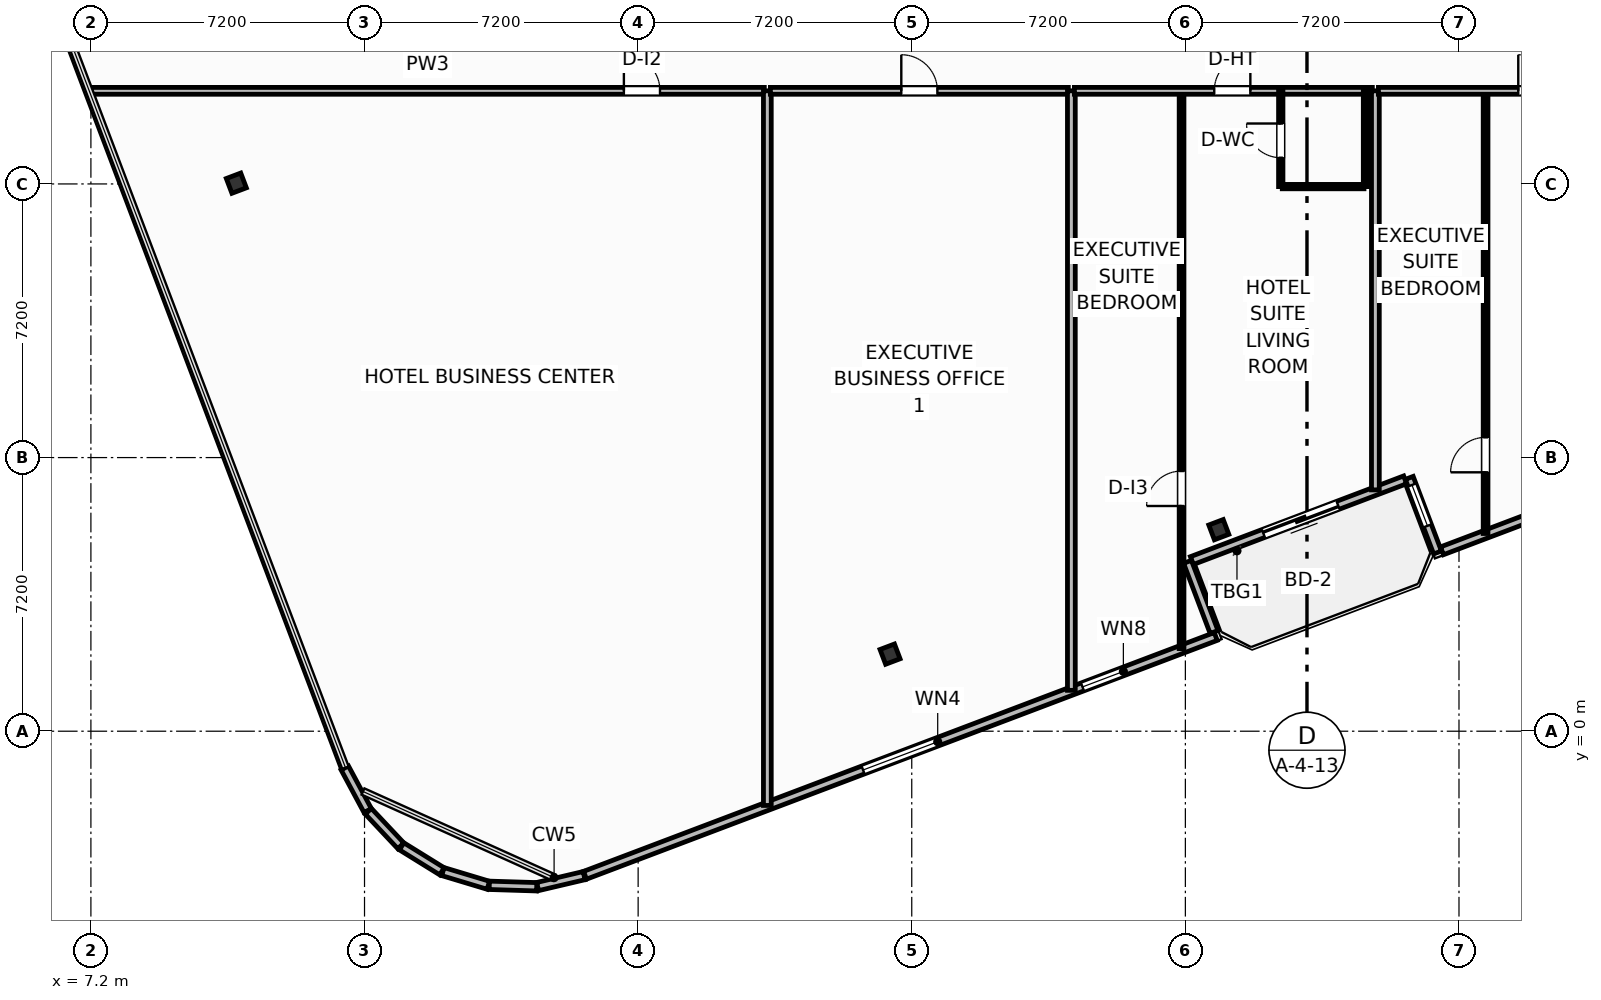
"""IFC4 building model, lengths in metres.
Left out: names, types, materials, properties, quantities, classifications, styles, units other than length and angle.
Written with IfcOpenShell. Run it as: python <this file> out.ifc"""

import sys

from ifc_helpers import new_model, si_unit, direction, frame, frame_2d, origin, origin_2d, place, context, subcontext, project, spatial, rectangle, i_section, extrude, element, fill, save


model = new_model("IFC4")
c1 = context("Model", 3, precision=1e-05, world=origin(), true_north=direction((0.0, 1.0)))
c2 = subcontext(c1, "Body", "Model", "MODEL_VIEW")
j1 = project(units=[si_unit("LENGTHUNIT", "METRE"), si_unit("PLANEANGLEUNIT", "RADIAN")], contexts=[c1])
p1 = place(None, origin())
s1 = spatial("IfcSite", under=j1, at=p1, CompositionType="ELEMENT")
p2 = place(p1, origin())
s2 = spatial("IfcBuilding", under=s1, at=p2, CompositionType="ELEMENT")
p3 = place(p2, frame((0.0, 0.0, 242.3)))
s3 = spatial("IfcBuildingStorey", under=s2, at=p3, CompositionType="ELEMENT", Elevation=242.3)
for number, where, z_axis, x_axis in (
    (1, (28.229, 2.028, 0.0), (0.0, 0.0, 1.0), (0.935, 0.354, 0.0)),
    (2, (36.88, 5.303, 0.0), (0.0, 0.0, 1.0), (0.935, 0.354, 0.0)),
    (3, (11.027, 14.42, 0.0), (0.0, 0.0, 1.0), (0.935, 0.354, 0.0)),
):
    element("IfcColumn", number, at=place(p3, frame(where, z_axis=z_axis, x_axis=x_axis)), inside=s3, PredefinedType="COLUMN", context=c2, shape_type="SweptSolid", body=[
        extrude(i_section(OverallWidth=0.406, OverallDepth=0.416, WebThickness=0.03, FlangeThickness=0.048, FilletRadius=0.025, at=origin_2d()), origin(), (0.0, 0.0, 1.0), 3.7),
    ])
p4 = place(p3, frame((41.783, 6.614, 0.0), z_axis=(0.0, 0.0, 1.0), x_axis=(-0.93521416643, -0.354082565101, 0.0)))
e4 = element("IfcWall", 4, at=p4, inside=s3, PredefinedType="SOLIDWALL", context=c2, shape_type="SweptSolid", body=[
    extrude(rectangle(XDim=6.0, YDim=0.22, at=frame_2d((3.0, 0.0))), origin(), (0.0, 0.0, 1.0), 2.73),
])
p5 = place(p4, frame((1.888, 0.0, 0.0)))
e5 = element("IfcOpeningElement", 5, at=p5, cuts=e4, PredefinedType="OPENING", context=c2, shape_type="SweptSolid", body=[
    extrude(rectangle(XDim=2.1, YDim=2.3, at=frame_2d((1.05, 1.15))), frame((0.0, 0.12, 0.0), z_axis=(0.0, -1.0, 0.0), x_axis=(1.0, 0.0, 0.0)), (0.0, 0.0, 1.0), 0.24),
])
p6 = place(p3, frame((13.881, -0.966, 0.0), z_axis=(0.0, 0.0, 1.0), x_axis=(0.473242342135, -0.88093228208, 0.0)))
e6 = element("IfcWall", 6, at=p6, inside=s3, PredefinedType="SOLIDWALL", context=c2, shape_type="SweptSolid", body=[
    extrude(rectangle(XDim=1.274, YDim=0.22, at=frame_2d((0.637, 0.0))), origin(), (0.0, 0.0, 1.0), 2.73),
])
for number, where, z_axis, x_axis in (
    (7, (14.5, -2.106, 0.0), (0.0, 0.0, 1.0), (0.685, -0.729, 0.0)),
    (8, (15.377, -3.029, 0.0), (0.0, 0.0, 1.0), (0.85, -0.526, 0.0)),
    (9, (16.463, -3.694, 0.0), (0.0, 0.0, 1.0), (0.958, -0.288, 0.0)),
):
    element("IfcWall", number, at=place(p3, frame(where, z_axis=z_axis, x_axis=x_axis)), inside=s3, PredefinedType="SOLIDWALL", context=c2, shape_type="SweptSolid", body=[
        extrude(rectangle(XDim=1.249, YDim=0.22, at=frame_2d((0.624, 0.0))), origin(), (0.0, 0.0, 1.0), 2.73),
    ])
p7 = place(p3, frame((17.683, -4.055, 0.0), z_axis=(0.0, 0.0, 1.0), x_axis=(0.999522886512, -0.030886879732, 0.0)))
e10 = element("IfcWall", 10, at=p7, inside=s3, PredefinedType="SOLIDWALL", context=c2, shape_type="SweptSolid", body=[
    extrude(rectangle(XDim=1.249, YDim=0.22, at=frame_2d((0.625, 0.0))), origin(), (0.0, 0.0, 1.0), 2.73),
])
p8 = place(p3, frame((18.956, -4.087, 0.0), z_axis=(0.0, 0.0, 1.0), x_axis=(0.973463008152, 0.228844426981, 0.0)))
e11 = element("IfcWall", 11, at=p8, inside=s3, PredefinedType="SOLIDWALL", context=c2, shape_type="SweptSolid", body=[
    extrude(rectangle(XDim=1.257, YDim=0.22, at=frame_2d((0.628, 0.0))), origin(), (0.0, 0.0, 1.0), 2.73),
])
p9 = place(p3, frame((20.202, -3.791, 0.0), z_axis=(0.0, 0.0, 1.0), x_axis=(0.935225574232, 0.354052432984, 0.0)))
e12 = element("IfcWall", 12, at=p9, inside=s3, PredefinedType="SOLIDWALL", context=c2, shape_type="SweptSolid", body=[
    extrude(rectangle(XDim=17.747, YDim=0.22, at=frame_2d((8.874, 0.0))), origin(), (0.0, 0.0, 1.0), 2.73),
])
p10 = place(p9, frame((7.823, 0.0, 0.8)))
e13 = element("IfcOpeningElement", 13, at=p10, cuts=e12, PredefinedType="OPENING", context=c2, shape_type="SweptSolid", body=[
    extrude(rectangle(XDim=2.1, YDim=1.75, at=frame_2d((1.05, 0.875))), frame((0.0, 0.12, 0.0), z_axis=(0.0, -1.0, 0.0), x_axis=(1.0, 0.0, 0.0)), (0.0, 0.0, 1.0), 0.24),
])
p11 = place(p9, frame((13.998, 0.0, 0.8)))
e14 = element("IfcOpeningElement", 14, at=p11, cuts=e12, PredefinedType="OPENING", context=c2, shape_type="SweptSolid", body=[
    extrude(rectangle(XDim=1.15, YDim=1.4, at=frame_2d((0.575, 0.7))), frame((0.0, 0.12, 0.0), z_axis=(0.0, -1.0, 0.0), x_axis=(1.0, 0.0, 0.0)), (0.0, 0.0, 1.0), 0.24),
])
p12 = place(p3, frame((36.755, 2.61, 0.0), z_axis=(0.0, 0.0, 1.0), x_axis=(-0.354020680661, 0.935237594232, 0.0)))
e15 = element("IfcWall", 15, at=p12, inside=s3, PredefinedType="SOLIDWALL", context=c2, shape_type="SweptSolid", body=[
    extrude(rectangle(XDim=1.975, YDim=0.22, at=frame_2d((0.988, 0.0))), origin(), (0.0, 0.0, 1.0), 2.73),
])
p13 = place(p3, frame((41.892, 6.666, 0.0), z_axis=(0.0, 0.0, 1.0), x_axis=(0.354128469405, -0.935196785258, 0.0)))
e16 = element("IfcWall", 16, at=p13, inside=s3, PredefinedType="SOLIDWALL", context=c2, shape_type="SweptSolid", body=[
    extrude(rectangle(XDim=2.1, YDim=0.22, at=frame_2d((1.05, 0.0))), origin(), (0.0, 0.0, 1.0), 2.73),
])
p14 = place(p13, frame((0.2, 0.0, 0.8)))
e17 = element("IfcOpeningElement", 17, at=p14, cuts=e16, PredefinedType="OPENING", context=c2, shape_type="SweptSolid", body=[
    extrude(rectangle(XDim=1.15, YDim=1.4, at=frame_2d((0.575, 0.7))), frame((0.0, 0.12, 0.0), z_axis=(0.0, -1.0, 0.0), x_axis=(1.0, 0.0, 0.0)), (0.0, 0.0, 1.0), 0.24),
])
p15 = place(p3, frame((42.752, 4.746, 0.0), z_axis=(0.0, 0.0, 1.0), x_axis=(0.935216926991, 0.354075273733, 0.0)))
e18 = element("IfcWall", 18, at=p15, inside=s3, PredefinedType="SOLIDWALL", context=c2, shape_type="SweptSolid", body=[
    extrude(rectangle(XDim=8.035, YDim=0.22, at=frame_2d((4.018, 0.0))), origin(), (0.0, 0.0, 1.0), 2.73),
])
p16 = place(p15, frame((2.968, 0.0, 0.8)))
e19 = element("IfcOpeningElement", 19, at=p16, cuts=e18, PredefinedType="OPENING", context=c2, shape_type="SweptSolid", body=[
    extrude(rectangle(XDim=2.1, YDim=1.75, at=frame_2d((1.05, 0.875))), frame((0.0, 0.12, 0.0), z_axis=(0.0, -1.0, 0.0), x_axis=(1.0, 0.0, 0.0)), (0.0, 0.0, 1.0), 0.24),
])
p17 = place(p3, frame((7.196, 16.85, 0.0), z_axis=(0.0, 0.0, 1.0), x_axis=(1.0, 0.0, 0.0)))
e20 = element("IfcWall", 20, at=p17, inside=s3, PredefinedType="PARTITIONING", context=c2, shape_type="SweptSolid", body=[
    extrude(rectangle(XDim=17.724, YDim=0.18, at=frame_2d((8.862, 0.0))), origin(), (0.0, 0.0, 1.0), 3.45),
])
p18 = place(p17, frame((14.029, 0.0, 0.0)))
e21 = element("IfcOpeningElement", 21, at=p18, cuts=e20, PredefinedType="OPENING", context=c2, shape_type="SweptSolid", body=[
    extrude(rectangle(XDim=0.95, YDim=2.05, at=frame_2d((0.475, 1.025))), frame((0.0, 0.1, 0.0), z_axis=(0.0, -1.0, 0.0), x_axis=(1.0, 0.0, 0.0)), (0.0, 0.0, 1.0), 0.2),
])
p19 = place(p3, frame((25.0, -1.953, 0.0), z_axis=(0.0, 0.0, 1.0), x_axis=(0.0, 1.0, 0.0)))
e22 = element("IfcWall", 22, at=p19, inside=s3, PredefinedType="PARTITIONING", context=c2, shape_type="SweptSolid", body=[
    extrude(rectangle(XDim=18.803, YDim=0.205, at=frame_2d((9.402, 0.0))), origin(), (0.0, 0.0, 1.0), 2.739),
])
p20 = place(p3, frame((25.08, 16.85, 0.0), z_axis=(0.0, 0.0, 1.0), x_axis=(1.0, 0.0, 0.0)))
e23 = element("IfcWall", 23, at=p20, inside=s3, PredefinedType="PARTITIONING", context=c2, shape_type="SweptSolid", body=[
    extrude(rectangle(XDim=7.84, YDim=0.18, at=frame_2d((3.92, 0.0))), origin(), (0.0, 0.0, 1.0), 3.45),
])
p21 = place(p20, frame((3.445, 0.0, 0.0)))
e24 = element("IfcOpeningElement", 24, at=p21, cuts=e23, PredefinedType="OPENING", context=c2, shape_type="SweptSolid", body=[
    extrude(rectangle(XDim=0.95, YDim=2.05, at=frame_2d((0.475, 1.025))), frame((0.0, 0.1, 0.0), z_axis=(0.0, -1.0, 0.0), x_axis=(1.0, 0.0, 0.0)), (0.0, 0.0, 1.0), 0.2),
])
p22 = place(p3, frame((33.0, 1.076, 0.0), z_axis=(0.0, 0.0, 1.0), x_axis=(0.0, 1.0, 0.0)))
e25 = element("IfcWall", 25, at=p22, inside=s3, PredefinedType="PARTITIONING", context=c2, shape_type="SweptSolid", body=[
    extrude(rectangle(XDim=15.774, YDim=0.205, at=frame_2d((7.887, 0.0))), origin(), (0.0, 0.0, 1.0), 3.45),
])
p23 = place(p3, frame((35.9, 2.174, 0.0), z_axis=(0.0, 0.0, 1.0), x_axis=(0.0, 1.0, 0.0)))
e26 = element("IfcWall", 26, at=p23, inside=s3, PredefinedType="PARTITIONING", context=c2, shape_type="SweptSolid", body=[
    extrude(rectangle(XDim=14.677, YDim=0.125, at=frame_2d((7.338, 0.0))), origin(), (0.0, 0.0, 1.0), 2.739),
])
p24 = place(p23, frame((3.752, 0.0, 0.0)))
e27 = element("IfcOpeningElement", 27, at=p24, cuts=e26, PredefinedType="OPENING", context=c2, shape_type="SweptSolid", body=[
    extrude(rectangle(XDim=0.92, YDim=2.05, at=frame_2d((0.46, 1.025))), frame((0.0, 0.073, 0.0), z_axis=(0.0, -1.0, 0.0), x_axis=(1.0, 0.0, 0.0)), (0.0, 0.0, 1.0), 0.145),
])
p25 = place(p3, frame((33.08, 16.85, 0.0), z_axis=(0.0, 0.0, 1.0), x_axis=(1.0, 0.0, 0.0)))
e28 = element("IfcWall", 28, at=p25, inside=s3, PredefinedType="PARTITIONING", context=c2, shape_type="SweptSolid", body=[
    extrude(rectangle(XDim=7.84, YDim=0.18, at=frame_2d((3.92, 0.0))), origin(), (0.0, 0.0, 1.0), 3.45),
])
p26 = place(p25, frame((3.68, 0.0, 0.0)))
e29 = element("IfcOpeningElement", 29, at=p26, cuts=e28, PredefinedType="OPENING", context=c2, shape_type="SweptSolid", body=[
    extrude(rectangle(XDim=0.95, YDim=2.15, at=frame_2d((0.475, 1.075))), frame((0.0, 0.1, 0.0), z_axis=(0.0, -1.0, 0.0), x_axis=(1.0, 0.0, 0.0)), (0.0, 0.0, 1.0), 0.2),
])
p27 = place(p3, frame((38.55, 14.33, 0.0), z_axis=(0.0, 0.0, 1.0), x_axis=(1.0, 0.0, 0.0)))
e30 = element("IfcWall", 30, at=p27, inside=s3, PredefinedType="PARTITIONING", context=c2, shape_type="SweptSolid", body=[
    extrude(rectangle(XDim=2.15, YDim=0.115, at=frame_2d((1.075, 0.0))), origin(), (0.0, 0.0, 1.0), 3.45),
])
p28 = place(p3, frame((38.51, 14.33, 0.0), z_axis=(0.0, 0.0, 1.0), x_axis=(0.0, 1.0, 0.0)))
e31 = element("IfcWall", 31, at=p28, inside=s3, PredefinedType="PARTITIONING", context=c2, shape_type="SweptSolid", body=[
    extrude(rectangle(XDim=2.52, YDim=0.115, at=frame_2d((1.26, 0.0))), origin(), (0.0, 0.0, 1.0), 3.45),
])
p29 = place(p28, frame((0.76, 0.0, 0.0)))
e32 = element("IfcOpeningElement", 32, at=p29, cuts=e31, PredefinedType="OPENING", context=c2, shape_type="SweptSolid", body=[
    extrude(rectangle(XDim=0.9, YDim=2.05, at=frame_2d((0.45, 1.025))), frame((0.0, 0.067, 0.0), z_axis=(0.0, -1.0, 0.0), x_axis=(1.0, 0.0, 0.0)), (0.0, 0.0, 1.0), 0.135),
])
p30 = place(p3, frame((40.74, 14.33, 0.0), z_axis=(0.0, 0.0, 1.0), x_axis=(0.0, 1.0, 0.0)))
e33 = element("IfcWall", 33, at=p30, inside=s3, PredefinedType="PARTITIONING", context=c2, shape_type="SweptSolid", body=[
    extrude(rectangle(XDim=2.52, YDim=0.115, at=frame_2d((1.26, 0.0))), origin(), (0.0, 0.0, 1.0), 3.45),
])
p31 = place(p3, frame((41.0, 6.35, 0.0), z_axis=(0.0, 0.0, 1.0), x_axis=(0.0, 1.0, 0.0)))
e34 = element("IfcWall", 34, at=p31, inside=s3, PredefinedType="PARTITIONING", context=c2, shape_type="SweptSolid", body=[
    extrude(rectangle(XDim=10.5, YDim=0.205, at=frame_2d((5.25, 0.0))), origin(), (0.0, 0.0, 1.0), 3.45),
])
p32 = place(p3, frame((43.9, 5.202, 0.0), z_axis=(0.0, 0.0, 1.0), x_axis=(0.0, 1.0, 0.0)))
e35 = element("IfcWall", 35, at=p32, inside=s3, PredefinedType="PARTITIONING", context=c2, shape_type="SweptSolid", body=[
    extrude(rectangle(XDim=11.648, YDim=0.125, at=frame_2d((5.824, 0.0))), origin(), (0.0, 0.0, 1.0), 3.45),
])
p33 = place(p32, frame((1.61, 0.0, 0.0)))
e36 = element("IfcOpeningElement", 36, at=p33, cuts=e35, PredefinedType="OPENING", context=c2, shape_type="SweptSolid", body=[
    extrude(rectangle(XDim=0.92, YDim=2.05, at=frame_2d((0.46, 1.025))), frame((0.0, 0.073, 0.0), z_axis=(0.0, -1.0, 0.0), x_axis=(1.0, 0.0, 0.0)), (0.0, 0.0, 1.0), 0.145),
])
p34 = place(p3, frame((41.08, 16.85, 0.0), z_axis=(0.0, 0.0, 1.0), x_axis=(1.0, 0.0, 0.0)))
e37 = element("IfcWall", 37, at=p34, inside=s3, PredefinedType="PARTITIONING", context=c2, shape_type="SweptSolid", body=[
    extrude(rectangle(XDim=7.84, YDim=0.18, at=frame_2d((3.92, 0.0))), origin(), (0.0, 0.0, 1.0), 3.45),
])
p35 = place(p34, frame((3.68, 0.0, 0.0)))
e38 = element("IfcOpeningElement", 38, at=p35, cuts=e37, PredefinedType="OPENING", context=c2, shape_type="SweptSolid", body=[
    extrude(rectangle(XDim=0.95, YDim=2.15, at=frame_2d((0.475, 1.075))), frame((0.0, 0.1, 0.0), z_axis=(0.0, -1.0, 0.0), x_axis=(1.0, 0.0, 0.0)), (0.0, 0.0, 1.0), 0.2),
])
p36 = place(p5, origin())
e39 = element("IfcDoor", 39, at=p36, inside=s3, OperationType="SLIDING_TO_LEFT", PredefinedType="DOOR", context=c2, shape_type="SweptSolid", body=[
    extrude(rectangle(XDim=2.1, YDim=2.3, at=frame_2d((1.05, 1.15))), frame((0.0, 0.025, 0.0), z_axis=(0.0, -1.0, 0.0), x_axis=(1.0, 0.0, 0.0)), (0.0, 0.0, 1.0), 0.05),
])
fill(e5, e39)
p37 = place(p10, origin())
e40 = element("IfcWindow", 40, at=p37, inside=s3, PartitioningType="SINGLE_PANEL", PredefinedType="WINDOW", context=c2, shape_type="SweptSolid", body=[
    extrude(rectangle(XDim=2.1, YDim=1.75, at=frame_2d((1.05, 0.875))), frame((0.0, 0.03, 0.0), z_axis=(0.0, -1.0, 0.0), x_axis=(1.0, 0.0, 0.0)), (0.0, 0.0, 1.0), 0.06),
])
fill(e13, e40)
p38 = place(p18, origin())
e41 = element("IfcDoor", 41, at=p38, inside=s3, OperationType="SINGLE_SWING_LEFT", PredefinedType="DOOR", context=c2, shape_type="SweptSolid", body=[
    extrude(rectangle(XDim=0.95, YDim=2.05, at=frame_2d((0.475, 1.025))), frame((0.0, 0.025, 0.0), z_axis=(0.0, -1.0, 0.0), x_axis=(1.0, 0.0, 0.0)), (0.0, 0.0, 1.0), 0.05),
])
fill(e21, e41)
p39 = place(p21, origin())
e42 = element("IfcDoor", 42, at=p39, inside=s3, OperationType="SINGLE_SWING_LEFT", PredefinedType="DOOR", context=c2, shape_type="SweptSolid", body=[
    extrude(rectangle(XDim=0.95, YDim=2.05, at=frame_2d((0.475, 1.025))), frame((0.0, 0.025, 0.0), z_axis=(0.0, -1.0, 0.0), x_axis=(1.0, 0.0, 0.0)), (0.0, 0.0, 1.0), 0.05),
])
fill(e24, e42)
p40 = place(p24, origin())
e43 = element("IfcDoor", 43, at=p40, inside=s3, OperationType="SINGLE_SWING_LEFT", PredefinedType="DOOR", context=c2, shape_type="SweptSolid", body=[
    extrude(rectangle(XDim=0.92, YDim=2.05, at=frame_2d((0.46, 1.025))), frame((0.0, 0.025, 0.0), z_axis=(0.0, -1.0, 0.0), x_axis=(1.0, 0.0, 0.0)), (0.0, 0.0, 1.0), 0.05),
])
fill(e27, e43)
p41 = place(p26, origin())
e44 = element("IfcDoor", 44, at=p41, inside=s3, OperationType="SINGLE_SWING_RIGHT", PredefinedType="DOOR", context=c2, shape_type="SweptSolid", body=[
    extrude(rectangle(XDim=0.95, YDim=2.15, at=frame_2d((0.475, 1.075))), frame((0.0, 0.025, 0.0), z_axis=(0.0, -1.0, 0.0), x_axis=(1.0, 0.0, 0.0)), (0.0, 0.0, 1.0), 0.05),
])
fill(e29, e44)
p42 = place(p29, origin())
e45 = element("IfcDoor", 45, at=p42, inside=s3, OperationType="SINGLE_SWING_RIGHT", PredefinedType="DOOR", context=c2, shape_type="SweptSolid", body=[
    extrude(rectangle(XDim=0.9, YDim=2.05, at=frame_2d((0.45, 1.025))), frame((0.0, 0.025, 0.0), z_axis=(0.0, -1.0, 0.0), x_axis=(1.0, 0.0, 0.0)), (0.0, 0.0, 1.0), 0.05),
])
fill(e32, e45)
p43 = place(p33, origin())
e46 = element("IfcDoor", 46, at=p43, inside=s3, OperationType="SINGLE_SWING_LEFT", PredefinedType="DOOR", context=c2, shape_type="SweptSolid", body=[
    extrude(rectangle(XDim=0.92, YDim=2.05, at=frame_2d((0.46, 1.025))), frame((0.0, 0.025, 0.0), z_axis=(0.0, -1.0, 0.0), x_axis=(1.0, 0.0, 0.0)), (0.0, 0.0, 1.0), 0.05),
])
fill(e36, e46)
p44 = place(p35, origin())
e47 = element("IfcDoor", 47, at=p44, inside=s3, OperationType="SINGLE_SWING_LEFT", PredefinedType="DOOR", context=c2, shape_type="SweptSolid", body=[
    extrude(rectangle(XDim=0.95, YDim=2.15, at=frame_2d((0.475, 1.075))), frame((0.0, 0.025, 0.0), z_axis=(0.0, -1.0, 0.0), x_axis=(1.0, 0.0, 0.0)), (0.0, 0.0, 1.0), 0.05),
])
fill(e38, e47)
p45 = place(p11, origin())
e48 = element("IfcWindow", 48, at=p45, inside=s3, PartitioningType="SINGLE_PANEL", PredefinedType="WINDOW", context=c2, shape_type="SweptSolid", body=[
    extrude(rectangle(XDim=1.15, YDim=1.4, at=frame_2d((0.575, 0.7))), frame((0.0, 0.03, 0.0), z_axis=(0.0, -1.0, 0.0), x_axis=(1.0, 0.0, 0.0)), (0.0, 0.0, 1.0), 0.06),
])
fill(e14, e48)
p46 = place(p14, origin())
e49 = element("IfcWindow", 49, at=p46, inside=s3, PartitioningType="SINGLE_PANEL", PredefinedType="WINDOW", context=c2, shape_type="SweptSolid", body=[
    extrude(rectangle(XDim=1.15, YDim=1.4, at=frame_2d((0.575, 0.7))), frame((0.0, 0.03, 0.0), z_axis=(0.0, -1.0, 0.0), x_axis=(1.0, 0.0, 0.0)), (0.0, 0.0, 1.0), 0.06),
])
fill(e17, e49)
save(model, sys.argv[1])
